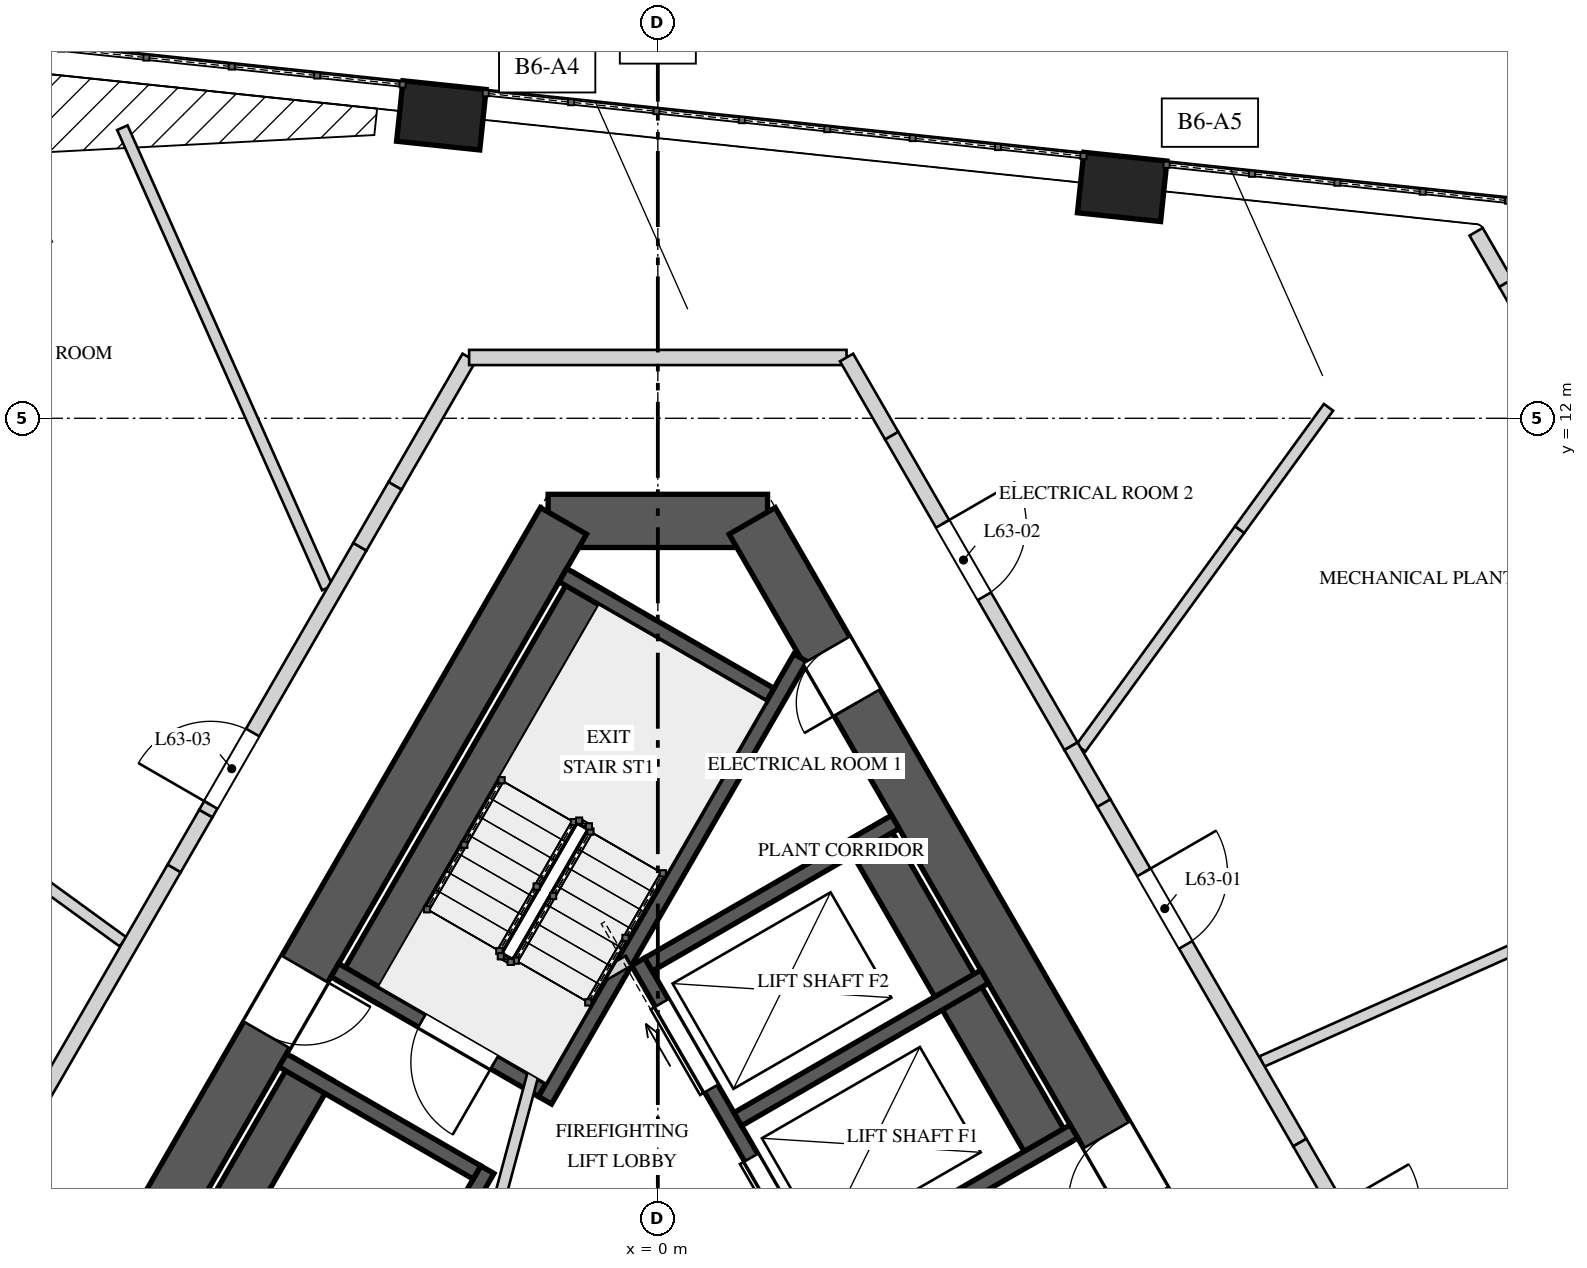
"""IFC4 building model, lengths in metres.
Left out: names, types, materials, properties, quantities, classifications, styles, units other than length and angle.
Written with IfcOpenShell. Run it as: python <this file> out.ifc"""

import sys

from ifc_helpers import new_model, si_unit, direction, frame, frame_2d, origin, origin_2d, place, context, subcontext, project, spatial, rectangle, extrude, element, fill, save


model = new_model("IFC4")
c1 = context("Model", 3, precision=1e-05, world=origin(), true_north=direction((0.0, 1.0)))
c2 = subcontext(c1, "Body", "Model", "MODEL_VIEW")
j1 = project(units=[si_unit("LENGTHUNIT", "METRE"), si_unit("PLANEANGLEUNIT", "RADIAN")], contexts=[c1])
p1 = place(None, origin())
s1 = spatial("IfcSite", under=j1, at=p1, CompositionType="ELEMENT")
p2 = place(p1, origin())
s2 = spatial("IfcBuilding", under=s1, at=p2, CompositionType="ELEMENT")
p3 = place(p2, frame((0.0, 0.0, 269.2)))
s3 = spatial("IfcBuildingStorey", under=s2, at=p3, CompositionType="ELEMENT", Elevation=269.2)
p4 = place(p3, frame((1.443, 10.65, 0.0), z_axis=(0.0, 0.0, 1.0), x_axis=(-1.0, 0.0, 0.0)))
e1 = element("IfcWall", 1, at=p4, inside=s3, PredefinedType="SHEAR", context=c2, shape_type="SweptSolid", body=[
    extrude(rectangle(XDim=2.887, YDim=0.7, at=frame_2d((1.443, 0.0))), origin(), (0.0, 0.0, 1.0), 5.2),
])
p5 = place(p3, frame((-1.241, 10.65, 0.0), z_axis=(0.0, 0.0, 1.0), x_axis=(-0.500003331888, -0.866023480109, 0.0)))
e2 = element("IfcWall", 2, at=p5, inside=s3, PredefinedType="SHEAR", context=c2, shape_type="SweptSolid", body=[
    extrude(rectangle(XDim=17.205, YDim=0.7, at=frame_2d((8.603, 0.0))), origin(), (0.0, 0.0, 1.0), 5.2),
])
p6 = place(p5, frame((6.808, 0.0, 0.0)))
e3 = element("IfcOpeningElement", 3, at=p6, cuts=e2, PredefinedType="OPENING", context=c2, shape_type="SweptSolid", body=[
    extrude(rectangle(XDim=1.0, YDim=2.4, at=frame_2d((0.5, 1.2))), frame((0.0, 0.36, 0.0), z_axis=(0.0, -1.0, 0.0), x_axis=(1.0, 0.0, 0.0)), (0.0, 0.0, 1.0), 0.72),
])
p7 = place(p3, frame((9.844, -4.25, 0.0), z_axis=(0.0, 0.0, 1.0), x_axis=(-0.500003331888, 0.866023480109, 0.0)))
e4 = element("IfcWall", 4, at=p7, inside=s3, PredefinedType="SHEAR", context=c2, shape_type="SweptSolid", body=[
    extrude(rectangle(XDim=17.205, YDim=0.7, at=frame_2d((8.603, 0.0))), origin(), (0.0, 0.0, 1.0), 5.2),
])
p8 = place(p7, frame((6.877, 0.0, 0.0)))
e5 = element("IfcOpeningElement", 5, at=p8, cuts=e4, PredefinedType="OPENING", context=c2, shape_type="SweptSolid", body=[
    extrude(rectangle(XDim=1.0, YDim=2.4, at=frame_2d((0.5, 1.2))), frame((0.0, 0.36, 0.0), z_axis=(0.0, -1.0, 0.0), x_axis=(1.0, 0.0, 0.0)), (0.0, 0.0, 1.0), 0.72),
])
p9 = place(p7, frame((14.445, 0.0, 0.0)))
e6 = element("IfcOpeningElement", 6, at=p9, cuts=e4, PredefinedType="OPENING", context=c2, shape_type="SweptSolid", body=[
    extrude(rectangle(XDim=0.8, YDim=2.1, at=frame_2d((0.4, 1.05))), frame((0.0, 0.36, 0.0), z_axis=(0.0, -1.0, 0.0), x_axis=(1.0, 0.0, 0.0)), (0.0, 0.0, 1.0), 0.72),
])
for number, where, z_axis, x_axis in (
    (7, (6.109, 15.044, 0.0), (0.0, 0.0, 1.0), (-0.995, 0.105, 0.0)),
    (8, (-2.848, 15.985, 0.0), (0.0, 0.0, 1.0), (-0.995, 0.105, 0.0)),
):
    element("IfcColumn", number, at=place(p3, frame(where, z_axis=z_axis, x_axis=x_axis)), inside=s3, PredefinedType="COLUMN", context=c2, shape_type="SweptSolid", body=[
        extrude(rectangle(XDim=1.1, YDim=0.8, at=origin_2d()), origin(), (0.0, 0.0, 1.0), 2.787),
    ])
p10 = place(p3, frame((-0.853, 9.823, 0.0), z_axis=(0.0, 0.0, 1.0), x_axis=(-0.500009909098, -0.866019682689, 0.0)))
e9 = element("IfcWall", 9, at=p10, inside=s3, PredefinedType="SOLIDWALL", context=c2, shape_type="SweptSolid", body=[
    extrude(rectangle(XDim=6.2, YDim=0.6, at=frame_2d((3.1, 0.0))), origin(), (0.0, 0.0, 1.0), 4.85),
])
p11 = place(p3, frame((1.876, 8.85, 0.0), z_axis=(0.0, 0.0, 1.0), x_axis=(-0.499998042495, -0.866026533947, 0.0)))
e10 = element("IfcWall", 10, at=p11, inside=s3, PredefinedType="SOLIDWALL", context=c2, shape_type="SweptSolid", body=[
    extrude(rectangle(XDim=6.723, YDim=0.2, at=frame_2d((3.361, 0.0))), origin(), (0.0, 0.0, 1.0), 4.85),
])
p12 = place(p3, frame((1.479, 8.361, 0.0), z_axis=(0.0, 0.0, 1.0), x_axis=(-0.866035871367, 0.499981869177, 0.0)))
e11 = element("IfcWall", 11, at=p12, inside=s3, PredefinedType="SOLIDWALL", context=c2, shape_type="SweptSolid", body=[
    extrude(rectangle(XDim=3.15, YDim=0.2, at=frame_2d((1.575, 0.0))), origin(), (0.0, 0.0, 1.0), 4.85),
])
p13 = place(p3, frame((-1.521, 3.165, 0.0), z_axis=(0.0, 0.0, 1.0), x_axis=(-0.866035871367, 0.499981869177, 0.0)))
e12 = element("IfcWall", 12, at=p13, inside=s3, PredefinedType="SOLIDWALL", context=c2, shape_type="SweptSolid", body=[
    extrude(rectangle(XDim=3.15, YDim=0.2, at=frame_2d((1.575, 0.0))), origin(), (0.0, 0.0, 1.0), 4.85),
])
p14 = place(p13, frame((0.725, 0.0, 0.0)))
e13 = element("IfcOpeningElement", 13, at=p14, cuts=e12, PredefinedType="OPENING", context=c2, shape_type="SweptSolid", body=[
    extrude(rectangle(XDim=1.1, YDim=2.4, at=frame_2d((0.55, 1.2))), frame((0.0, 0.11, 0.0), z_axis=(0.0, -1.0, 0.0), x_axis=(1.0, 0.0, 0.0)), (0.0, 0.0, 1.0), 0.22),
])
p15 = place(p3, frame((-4.993, -2.648, 0.0), z_axis=(0.0, 0.0, 1.0), x_axis=(0.499996545922, 0.866027397988, 0.0)))
e14 = element("IfcWall", 14, at=p15, inside=s3, PredefinedType="SOLIDWALL", context=c2, shape_type="SweptSolid", body=[
    extrude(rectangle(XDim=5.5, YDim=0.2, at=frame_2d((2.75, 0.0))), origin(), (0.0, 0.0, 1.0), 4.85),
])
p16 = place(p15, frame((3.12, 0.0, 0.0)))
e15 = element("IfcOpeningElement", 15, at=p16, cuts=e14, PredefinedType="OPENING", context=c2, shape_type="SweptSolid", body=[
    extrude(rectangle(XDim=0.95, YDim=2.4, at=frame_2d((0.475, 1.2))), frame((0.0, 0.11, 0.0), z_axis=(0.0, -1.0, 0.0), x_axis=(1.0, 0.0, 0.0)), (0.0, 0.0, 1.0), 0.22),
])
p17 = place(p15, frame((0.605, 0.0, 0.0)))
e16 = element("IfcOpeningElement", 16, at=p17, cuts=e14, PredefinedType="OPENING", context=c2, shape_type="SweptSolid", body=[
    extrude(rectangle(XDim=0.8, YDim=2.1, at=frame_2d((0.4, 1.05))), frame((0.0, 0.11, 0.0), z_axis=(0.0, -1.0, 0.0), x_axis=(1.0, 0.0, 0.0)), (0.0, 0.0, 1.0), 0.22),
])
p18 = place(p3, frame((-4.538, 3.44, 0.0), z_axis=(0.0, 0.0, 1.0), x_axis=(-0.499996545922, -0.866027397988, 0.0)))
e17 = element("IfcWall", 17, at=p18, inside=s3, PredefinedType="SOLIDWALL", context=c2, shape_type="SweptSolid", body=[
    extrude(rectangle(XDim=5.5, YDim=0.6, at=frame_2d((2.75, 0.0))), origin(), (0.0, 0.0, 1.0), 4.85),
])
p19 = place(p3, frame((-2.38, 2.078, 0.0), z_axis=(0.0, 0.0, 1.0), x_axis=(-0.866060182126, 0.499939757307, 0.0)))
e18 = element("IfcWall", 18, at=p19, inside=s3, PredefinedType="SOLIDWALL", context=c2, shape_type="SweptSolid", body=[
    extrude(rectangle(XDim=2.95, YDim=0.2, at=frame_2d((1.475, 0.0))), origin(), (0.0, 0.0, 1.0), 4.85),
])
p20 = place(p3, frame((2.19, 0.606, 0.0), z_axis=(0.0, 0.0, 1.0), x_axis=(-0.500002801628, 0.866023786258, 0.0)))
e19 = element("IfcWall", 19, at=p20, inside=s3, PredefinedType="SOLIDWALL", context=c2, shape_type="SweptSolid", body=[
    extrude(rectangle(XDim=4.9, YDim=0.2, at=frame_2d((2.45, 0.0))), origin(), (0.0, 0.0, 1.0), 4.85),
])
p21 = place(p20, frame((0.625, 0.0, 0.0)))
e20 = element("IfcOpeningElement", 20, at=p21, cuts=e19, PredefinedType="OPENING", context=c2, shape_type="SweptSolid", body=[
    extrude(rectangle(XDim=1.3, YDim=2.1, at=frame_2d((0.65, 1.05))), frame((0.0, 0.11, 0.0), z_axis=(0.0, -1.0, 0.0), x_axis=(1.0, 0.0, 0.0)), (0.0, 0.0, 1.0), 0.22),
])
p22 = place(p20, frame((2.975, 0.0, 0.0)))
e21 = element("IfcOpeningElement", 21, at=p22, cuts=e19, PredefinedType="OPENING", context=c2, shape_type="SweptSolid", body=[
    extrude(rectangle(XDim=1.3, YDim=2.1, at=frame_2d((0.65, 1.05))), frame((0.0, 0.11, 0.0), z_axis=(0.0, -1.0, 0.0), x_axis=(1.0, 0.0, 0.0)), (0.0, 0.0, 1.0), 0.22),
])
p23 = place(p3, frame((5.178, 2.331, 0.0), z_axis=(0.0, 0.0, 1.0), x_axis=(-0.49998122708, 0.866036242063, 0.0)))
e22 = element("IfcWall", 22, at=p23, inside=s3, PredefinedType="SOLIDWALL", context=c2, shape_type="SweptSolid", body=[
    extrude(rectangle(XDim=4.9, YDim=0.6, at=frame_2d((2.45, 0.0))), origin(), (0.0, 0.0, 1.0), 4.85),
])
p24 = place(p3, frame((2.227, 0.743, 0.0), z_axis=(0.0, 0.0, 1.0), x_axis=(0.866022959057, 0.500004234368, 0.0)))
e23 = element("IfcWall", 23, at=p24, inside=s3, PredefinedType="SOLIDWALL", context=c2, shape_type="SweptSolid", body=[
    extrude(rectangle(XDim=3.75, YDim=0.2, at=frame_2d((1.875, 0.0))), origin(), (0.0, 0.0, 1.0), 4.85),
])
p25 = place(p3, frame((1.052, 2.778, 0.0), z_axis=(0.0, 0.0, 1.0), x_axis=(0.866039234136, 0.499976044363, 0.0)))
e24 = element("IfcWall", 24, at=p25, inside=s3, PredefinedType="SOLIDWALL", context=c2, shape_type="SweptSolid", body=[
    extrude(rectangle(XDim=3.75, YDim=0.2, at=frame_2d((1.875, 0.0))), origin(), (0.0, 0.0, 1.0), 4.85),
])
p26 = place(p3, frame((-0.123, 4.813, 0.0), z_axis=(0.0, 0.0, 1.0), x_axis=(0.866022959057, 0.500004234368, 0.0)))
e25 = element("IfcWall", 25, at=p26, inside=s3, PredefinedType="SOLIDWALL", context=c2, shape_type="SweptSolid", body=[
    extrude(rectangle(XDim=3.75, YDim=0.2, at=frame_2d((1.875, 0.0))), origin(), (0.0, 0.0, 1.0), 4.85),
])
p27 = place(p3, frame((-2.178, 1.372, 0.0), z_axis=(0.0, 0.0, 1.0), x_axis=(0.258808958833, 0.96592852884, 0.0)))
e26 = element("IfcWall", 26, at=p27, inside=s3, PredefinedType="PARTITIONING", context=c2, shape_type="SweptSolid", body=[
    extrude(rectangle(XDim=2.903, YDim=0.15, at=frame_2d((1.451, 0.0))), origin(), (0.0, 0.0, 1.0), 4.85),
])
p28 = place(p3, frame((-1.51, 4.215, 0.0), z_axis=(0.0, 0.0, 1.0), x_axis=(0.866085525409, 0.49989585183, 0.0)))
e27 = element("IfcWall", 27, at=p28, inside=s3, PredefinedType="PARTITIONING", context=c2, shape_type="SweptSolid", body=[
    extrude(rectangle(XDim=1.3, YDim=0.15, at=frame_2d((0.65, 0.0))), origin(), (0.0, 0.0, 1.0), 4.85),
])
p29 = place(p3, frame((-7.037, 5.112, 0.0), z_axis=(0.0, 0.0, 1.0), x_axis=(-0.809012919045, 0.587790861462, 0.0)))
e28 = element("IfcWall", 28, at=p29, inside=s3, PredefinedType="PARTITIONING", context=c2, shape_type="SweptSolid", body=[
    extrude(rectangle(XDim=8.044, YDim=0.15, at=frame_2d((4.022, 0.0))), origin(), (0.0, 0.0, 1.0), 4.85),
])
p30 = place(p3, frame((-4.349, 9.768, 0.0), z_axis=(0.0, 0.0, 1.0), x_axis=(-0.406736425393, 0.913545554561, 0.0)))
e29 = element("IfcWall", 29, at=p30, inside=s3, PredefinedType="PARTITIONING", context=c2, shape_type="SweptSolid", body=[
    extrude(rectangle(XDim=6.628, YDim=0.15, at=frame_2d((3.314, 0.0))), origin(), (0.0, 0.0, 1.0), 4.85),
])
p31 = place(p3, frame((5.565, 7.66, 0.0), z_axis=(0.0, 0.0, 1.0), x_axis=(0.587787750024, 0.809015179661, 0.0)))
e30 = element("IfcWall", 30, at=p31, inside=s3, PredefinedType="PARTITIONING", context=c2, shape_type="SweptSolid", body=[
    extrude(rectangle(XDim=3.555, YDim=0.15, at=frame_2d((1.777, 0.0))), origin(), (0.0, 0.0, 1.0), 3.95),
])
p32 = place(p3, frame((7.655, 10.536, 0.0), z_axis=(0.0, 0.0, 1.0), x_axis=(0.587748103299, 0.809043983396, 0.0)))
e31 = element("IfcWall", 31, at=p32, inside=s3, PredefinedType="PARTITIONING", context=c2, shape_type="SweptSolid", body=[
    extrude(rectangle(XDim=1.988, YDim=0.15, at=frame_2d((0.994, 0.0))), origin(), (0.0, 0.0, 1.0), 4.85),
])
p33 = place(p3, frame((15.294, 6.81, 0.0), z_axis=(0.0, 0.0, 1.0), x_axis=(-0.91353850426, -0.406752260269, 0.0)))
e32 = element("IfcWall", 32, at=p33, inside=s3, PredefinedType="PARTITIONING", context=c2, shape_type="SweptSolid", body=[
    extrude(rectangle(XDim=8.044, YDim=0.15, at=frame_2d((4.022, 0.0))), origin(), (0.0, 0.0, 1.0), 4.85),
])
p34 = place(p3, frame((-8.941, 1.613, 0.0), z_axis=(0.0, 0.0, 1.0), x_axis=(0.499973847261, 0.866040502549, 0.0)))
e33 = element("IfcWall", 33, at=p34, inside=s3, PredefinedType="SOLIDWALL", context=c2, shape_type="SweptSolid", body=[
    extrude(rectangle(XDim=5.156, YDim=0.2, at=frame_2d((2.578, 0.0))), origin(), (0.0, 0.0, 1.0), 4.85),
])
p35 = place(p3, frame((-6.363, 6.079, 0.0), z_axis=(0.0, 0.0, 1.0), x_axis=(0.499950631041, 0.86605390509, 0.0)))
e34 = element("IfcWall", 34, at=p35, inside=s3, PredefinedType="SOLIDWALL", context=c2, shape_type="SweptSolid", body=[
    extrude(rectangle(XDim=0.833, YDim=0.2, at=frame_2d((0.417, 0.0))), origin(), (0.0, 0.0, 1.0), 3.95),
])
p36 = place(p3, frame((-5.947, 6.801, 0.0), z_axis=(0.0, 0.0, 1.0), x_axis=(0.500007556608, 0.866021040931, 0.0)))
e35 = element("IfcWall", 35, at=p36, inside=s3, PredefinedType="SOLIDWALL", context=c2, shape_type="SweptSolid", body=[
    extrude(rectangle(XDim=4.052, YDim=0.2, at=frame_2d((2.026, 0.0))), origin(), (0.0, 0.0, 1.0), 4.85),
])
p37 = place(p36, frame((0.131, 0.0, 0.0)))
e36 = element("IfcOpeningElement", 36, at=p37, cuts=e35, PredefinedType="OPENING", context=c2, shape_type="SweptSolid", body=[
    extrude(rectangle(XDim=1.1, YDim=2.2, at=frame_2d((0.55, 1.1))), frame((0.0, 0.11, 0.0), z_axis=(0.0, -1.0, 0.0), x_axis=(1.0, 0.0, 0.0)), (0.0, 0.0, 1.0), 0.22),
])
p38 = place(p3, frame((-3.92, 10.31, 0.0), z_axis=(0.0, 0.0, 1.0), x_axis=(0.500102178127, 0.865966403178, 0.0)))
e37 = element("IfcWall", 37, at=p38, inside=s3, PredefinedType="SOLIDWALL", context=c2, shape_type="SweptSolid", body=[
    extrude(rectangle(XDim=0.927, YDim=0.2, at=frame_2d((0.464, 0.0))), origin(), (0.0, 0.0, 1.0), 4.15),
])
p39 = place(p3, frame((-3.457, 11.113, 0.0), z_axis=(0.0, 0.0, 1.0), x_axis=(0.499953905513, 0.866052014814, 0.0)))
e38 = element("IfcWall", 38, at=p39, inside=s3, PredefinedType="SOLIDWALL", context=c2, shape_type="SweptSolid", body=[
    extrude(rectangle(XDim=1.948, YDim=0.2, at=frame_2d((0.974, 0.0))), origin(), (0.0, 0.0, 1.0), 4.85),
])
p40 = place(p3, frame((-2.483, 12.8, 0.0), z_axis=(0.0, 0.0, 1.0), x_axis=(1.0, 0.0, 0.0)))
e39 = element("IfcWall", 39, at=p40, inside=s3, PredefinedType="SOLIDWALL", context=c2, shape_type="SweptSolid", body=[
    extrude(rectangle(XDim=4.965, YDim=0.2, at=frame_2d((2.483, 0.0))), origin(), (0.0, 0.0, 1.0), 4.85),
])
p41 = place(p3, frame((2.483, 12.8, 0.0), z_axis=(0.0, 0.0, 1.0), x_axis=(0.499983247966, -0.86603507536, 0.0)))
e40 = element("IfcWall", 40, at=p41, inside=s3, PredefinedType="SOLIDWALL", context=c2, shape_type="SweptSolid", body=[
    extrude(rectangle(XDim=1.188, YDim=0.2, at=frame_2d((0.594, 0.0))), origin(), (0.0, 0.0, 1.0), 4.15),
])
p42 = place(p3, frame((3.077, 11.771, 0.0), z_axis=(0.0, 0.0, 1.0), x_axis=(0.500007683529, -0.866020967652, 0.0)))
e41 = element("IfcWall", 41, at=p42, inside=s3, PredefinedType="SOLIDWALL", context=c2, shape_type="SweptSolid", body=[
    extrude(rectangle(XDim=4.717, YDim=0.2, at=frame_2d((2.359, 0.0))), origin(), (0.0, 0.0, 1.0), 4.85),
])
p43 = place(p42, frame((1.339, 0.0, 0.0)))
e42 = element("IfcOpeningElement", 42, at=p43, cuts=e41, PredefinedType="OPENING", context=c2, shape_type="SweptSolid", body=[
    extrude(rectangle(XDim=1.1, YDim=2.2, at=frame_2d((0.55, 1.1))), frame((0.0, 0.11, 0.0), z_axis=(0.0, -1.0, 0.0), x_axis=(1.0, 0.0, 0.0)), (0.0, 0.0, 1.0), 0.22),
])
p44 = place(p3, frame((5.436, 7.686, 0.0), z_axis=(0.0, 0.0, 1.0), x_axis=(0.500056482814, -0.86599279096, 0.0)))
e43 = element("IfcWall", 43, at=p44, inside=s3, PredefinedType="SOLIDWALL", context=c2, shape_type="SweptSolid", body=[
    extrude(rectangle(XDim=0.865, YDim=0.2, at=frame_2d((0.432, 0.0))), origin(), (0.0, 0.0, 1.0), 3.95),
])
p45 = place(p3, frame((5.868, 6.937, 0.0), z_axis=(0.0, 0.0, 1.0), x_axis=(0.499973847261, -0.866040502549, 0.0)))
e44 = element("IfcWall", 44, at=p45, inside=s3, PredefinedType="SOLIDWALL", context=c2, shape_type="SweptSolid", body=[
    extrude(rectangle(XDim=5.156, YDim=0.2, at=frame_2d((2.578, 0.0))), origin(), (0.0, 0.0, 1.0), 4.85),
])
p46 = place(p45, frame((1.052, 0.0, 0.0)))
e45 = element("IfcOpeningElement", 45, at=p46, cuts=e44, PredefinedType="OPENING", context=c2, shape_type="SweptSolid", body=[
    extrude(rectangle(XDim=1.1, YDim=2.2, at=frame_2d((0.55, 1.1))), frame((0.0, 0.11, 0.0), z_axis=(0.0, -1.0, 0.0), x_axis=(1.0, 0.0, 0.0)), (0.0, 0.0, 1.0), 0.22),
])
p47 = place(p3, frame((8.446, 2.471, 0.0), z_axis=(0.0, 0.0, 1.0), x_axis=(0.499950631041, -0.86605390509, 0.0)))
e46 = element("IfcWall", 46, at=p47, inside=s3, PredefinedType="SOLIDWALL", context=c2, shape_type="SweptSolid", body=[
    extrude(rectangle(XDim=0.833, YDim=0.2, at=frame_2d((0.417, 0.0))), origin(), (0.0, 0.0, 1.0), 3.95),
])
p48 = place(p3, frame((10.765, 14.454, 0.0), z_axis=(0.0, 0.0, 1.0), x_axis=(0.50003806587, -0.866003425329, 0.0)))
e47 = element("IfcWall", 47, at=p48, inside=s3, PredefinedType="SOLIDWALL", context=c2, shape_type="SweptSolid", body=[
    extrude(rectangle(XDim=0.781, YDim=0.2, at=frame_2d((0.391, 0.0))), origin(), (0.0, 0.0, 1.0), 3.95),
])
p49 = place(p3, frame((11.156, 13.777, 0.0), z_axis=(0.0, 0.0, 1.0), x_axis=(0.499984626538, -0.866034279475, 0.0)))
e48 = element("IfcWall", 48, at=p49, inside=s3, PredefinedType="SOLIDWALL", context=c2, shape_type="SweptSolid", body=[
    extrude(rectangle(XDim=10.775, YDim=0.2, at=frame_2d((5.387, 0.0))), origin(), (0.0, 0.0, 1.0), 4.85),
])
p50 = place(p14, origin())
e49 = element("IfcDoor", 49, at=p50, inside=s3, OperationType="SINGLE_SWING_RIGHT", PredefinedType="DOOR", context=c2, shape_type="SweptSolid", body=[
    extrude(rectangle(XDim=1.1, YDim=2.4, at=frame_2d((0.55, 1.2))), frame((0.0, 0.025, 0.0), z_axis=(0.0, -1.0, 0.0), x_axis=(1.0, 0.0, 0.0)), (0.0, 0.0, 1.0), 0.05),
])
fill(e13, e49)
p51 = place(p21, origin())
e50 = element("IfcDoor", 50, at=p51, inside=s3, OperationType="SLIDING_TO_LEFT", PredefinedType="DOOR", context=c2, shape_type="SweptSolid", body=[
    extrude(rectangle(XDim=1.3, YDim=2.1, at=frame_2d((0.65, 1.05))), frame((0.0, 0.025, 0.0), z_axis=(0.0, -1.0, 0.0), x_axis=(1.0, 0.0, 0.0)), (0.0, 0.0, 1.0), 0.05),
])
fill(e20, e50)
p52 = place(p22, origin())
e51 = element("IfcDoor", 51, at=p52, inside=s3, OperationType="SLIDING_TO_RIGHT", PredefinedType="DOOR", context=c2, shape_type="SweptSolid", body=[
    extrude(rectangle(XDim=1.3, YDim=2.1, at=frame_2d((0.65, 1.05))), frame((0.0, 0.025, 0.0), z_axis=(0.0, -1.0, 0.0), x_axis=(1.0, 0.0, 0.0)), (0.0, 0.0, 1.0), 0.05),
])
fill(e21, e51)
p53 = place(p6, origin())
e52 = element("IfcDoor", 52, at=p53, inside=s3, OperationType="SINGLE_SWING_RIGHT", PredefinedType="DOOR", context=c2, shape_type="SweptSolid", body=[
    extrude(rectangle(XDim=1.0, YDim=2.4, at=frame_2d((0.5, 1.2))), frame((0.0, 0.025, 0.0), z_axis=(0.0, -1.0, 0.0), x_axis=(1.0, 0.0, 0.0)), (0.0, 0.0, 1.0), 0.05),
])
fill(e3, e52)
p54 = place(p8, origin())
e53 = element("IfcDoor", 53, at=p54, inside=s3, OperationType="SINGLE_SWING_RIGHT", PredefinedType="DOOR", context=c2, shape_type="SweptSolid", body=[
    extrude(rectangle(XDim=1.0, YDim=2.4, at=frame_2d((0.5, 1.2))), frame((0.0, 0.025, 0.0), z_axis=(0.0, -1.0, 0.0), x_axis=(1.0, 0.0, 0.0)), (0.0, 0.0, 1.0), 0.05),
])
fill(e5, e53)
p55 = place(p9, origin())
e54 = element("IfcDoor", 54, at=p55, inside=s3, OperationType="SINGLE_SWING_RIGHT", PredefinedType="DOOR", context=c2, shape_type="SweptSolid", body=[
    extrude(rectangle(XDim=0.8, YDim=2.1, at=frame_2d((0.4, 1.05))), frame((0.0, 0.025, 0.0), z_axis=(0.0, -1.0, 0.0), x_axis=(1.0, 0.0, 0.0)), (0.0, 0.0, 1.0), 0.05),
])
fill(e6, e54)
p56 = place(p46, origin())
e55 = element("IfcDoor", 55, at=p56, inside=s3, OperationType="SINGLE_SWING_LEFT", PredefinedType="DOOR", context=c2, shape_type="SweptSolid", body=[
    extrude(rectangle(XDim=1.1, YDim=2.2, at=frame_2d((0.55, 1.1))), frame((0.0, 0.025, 0.0), z_axis=(0.0, -1.0, 0.0), x_axis=(1.0, 0.0, 0.0)), (0.0, 0.0, 1.0), 0.05),
])
fill(e45, e55)
p57 = place(p43, origin())
e56 = element("IfcDoor", 56, at=p57, inside=s3, OperationType="SINGLE_SWING_RIGHT", PredefinedType="DOOR", context=c2, shape_type="SweptSolid", body=[
    extrude(rectangle(XDim=1.1, YDim=2.2, at=frame_2d((0.55, 1.1))), frame((0.0, 0.025, 0.0), z_axis=(0.0, -1.0, 0.0), x_axis=(1.0, 0.0, 0.0)), (0.0, 0.0, 1.0), 0.05),
])
fill(e42, e56)
p58 = place(p37, origin())
e57 = element("IfcDoor", 57, at=p58, inside=s3, OperationType="SINGLE_SWING_LEFT", PredefinedType="DOOR", context=c2, shape_type="SweptSolid", body=[
    extrude(rectangle(XDim=1.1, YDim=2.2, at=frame_2d((0.55, 1.1))), frame((0.0, 0.025, 0.0), z_axis=(0.0, -1.0, 0.0), x_axis=(1.0, 0.0, 0.0)), (0.0, 0.0, 1.0), 0.05),
])
fill(e36, e57)
save(model, sys.argv[1])
